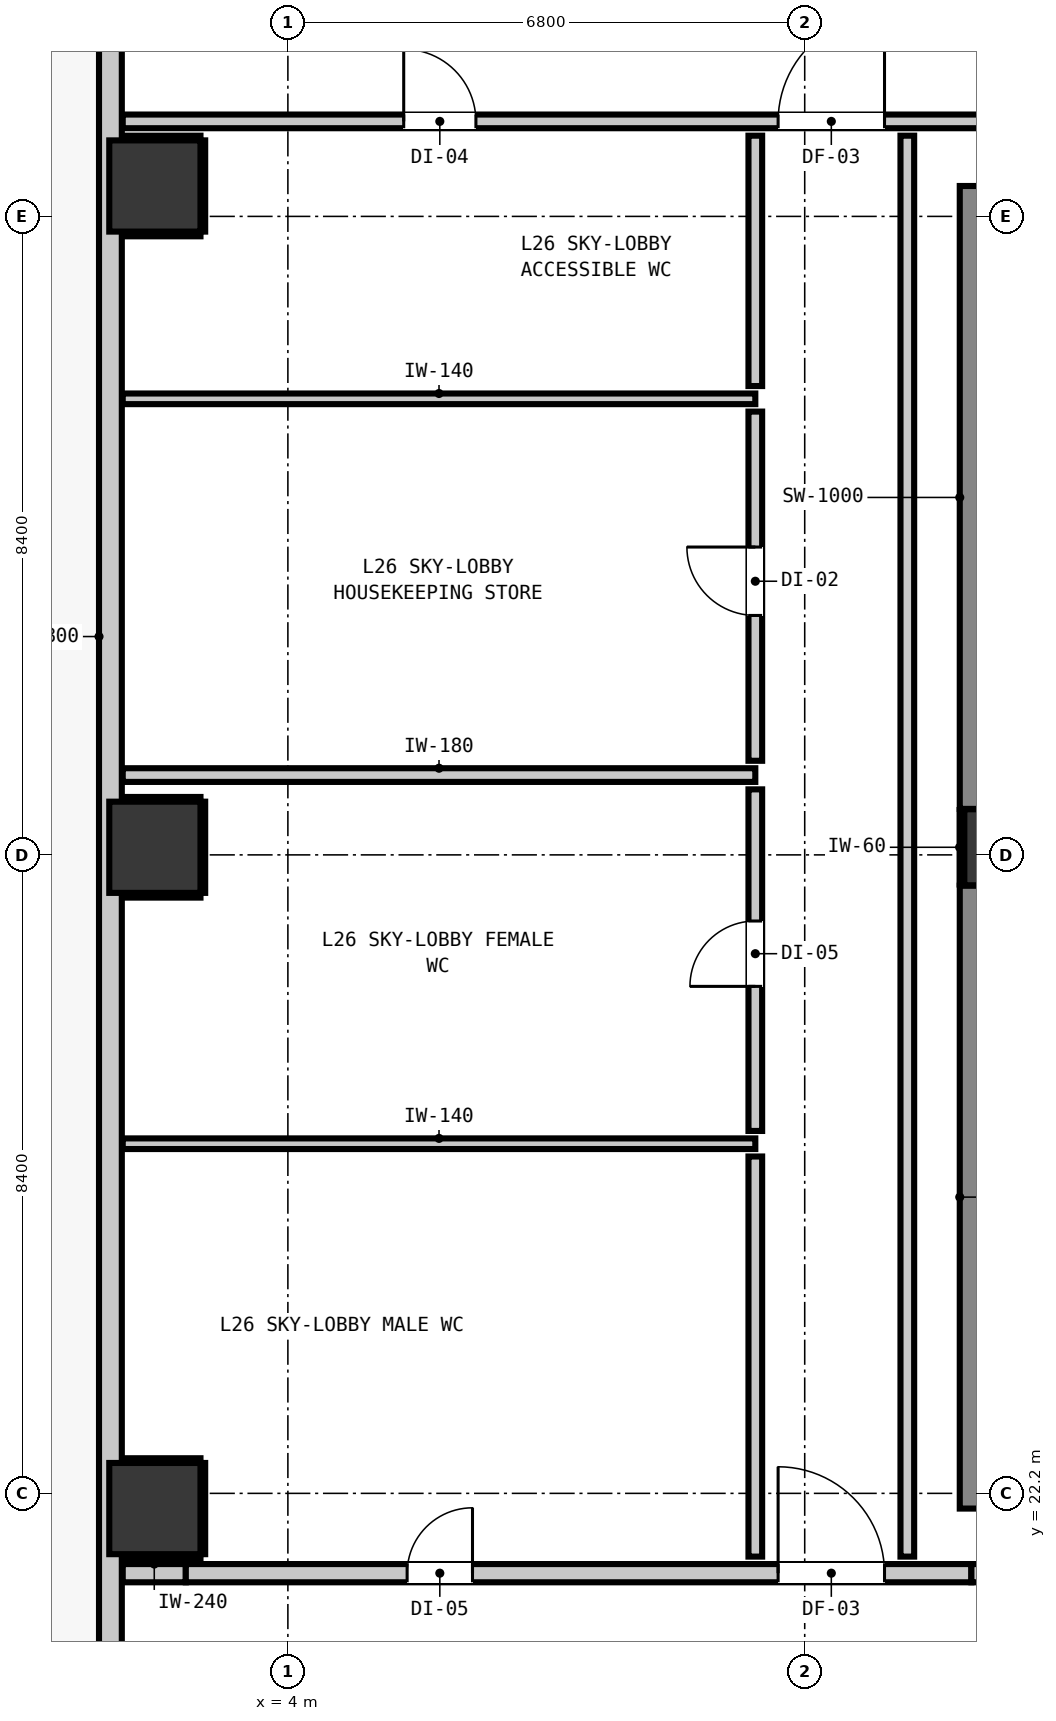
"""IFC4 building model, lengths in metres.
Left out: names, types, materials, properties, quantities, classifications, styles, units other than length and angle.
Written with IfcOpenShell. Run it as: python <this file> out.ifc"""

import sys

from ifc_helpers import new_model, si_unit, direction, frame, frame_2d, origin, origin_2d, place, context, subcontext, project, spatial, rectangle, extrude, element, fill, save


model = new_model("IFC4")
c1 = context("Model", 3, precision=1e-05, world=origin(), true_north=direction((0.0, 1.0)))
c2 = subcontext(c1, "Body", "Model", "MODEL_VIEW")
j1 = project(units=[si_unit("LENGTHUNIT", "METRE"), si_unit("PLANEANGLEUNIT", "RADIAN")], contexts=[c1])
p1 = place(None, origin())
s1 = spatial("IfcSite", under=j1, at=p1, CompositionType="ELEMENT")
p2 = place(p1, origin())
s2 = spatial("IfcBuilding", under=s1, at=p2, CompositionType="ELEMENT")
p3 = place(p2, frame((0.0, 0.0, 92.8)))
s3 = spatial("IfcBuildingStorey", under=s2, at=p3, CompositionType="ELEMENT", Elevation=92.8)
p4 = place(p3, frame((13.4, 30.7, 0.0), z_axis=(0.0, 0.0, 1.0), x_axis=(1.0, 0.0, 0.0)))
e1 = element("IfcColumn", 1, at=p4, inside=s3, PredefinedType="COLUMN", context=c2, shape_type="SweptSolid", body=[
    extrude(rectangle(XDim=1.0, YDim=1.0, at=origin_2d()), origin(), (0.0, 0.0, 1.0), 3.32),
])
p5 = place(p3, frame((13.34, 22.0, 0.0), z_axis=(0.0, 0.0, 1.0), x_axis=(0.0, 1.0, 0.0)))
e2 = element("IfcWall", 2, at=p5, inside=s3, PredefinedType="SHEAR", context=c2, shape_type="SweptSolid", body=[
    extrude(rectangle(XDim=8.195, YDim=1.0, at=frame_2d((4.098, 0.0))), origin(), (0.0, 0.0, 1.0), 3.32),
])
p6 = place(p3, frame((13.34, 31.205, 0.0), z_axis=(0.0, 0.0, 1.0), x_axis=(0.0, 1.0, 0.0)))
e3 = element("IfcWall", 3, at=p6, inside=s3, PredefinedType="SHEAR", context=c2, shape_type="SweptSolid", body=[
    extrude(rectangle(XDim=8.195, YDim=1.0, at=frame_2d((4.097, 0.0))), origin(), (0.0, 0.0, 1.0), 3.32),
])
for number, where, z_axis, x_axis in (
    (4, (2.25, 22.0, 0.0), (0.0, 0.0, 1.0), (1.0, 0.0, 0.0)),
    (5, (2.25, 30.7, 0.0), (0.0, 0.0, 1.0), (1.0, 0.0, 0.0)),
    (6, (2.25, 39.4, 0.0), (0.0, 0.0, 1.0), (1.0, 0.0, 0.0)),
):
    element("IfcColumn", number, at=place(p3, frame(where, z_axis=z_axis, x_axis=x_axis)), inside=s3, PredefinedType="COLUMN", context=c2, shape_type="SweptSolid", body=[
        extrude(rectangle(XDim=1.2, YDim=1.2, at=origin_2d()), origin(), (0.0, 0.0, 1.0), 3.32),
    ])
p7 = place(p3, frame((1.665, 16.365, 0.0), z_axis=(0.0, 0.0, 1.0), x_axis=(0.0, 1.0, 0.0)))
e7 = element("IfcWall", 7, at=p7, inside=s3, PredefinedType="STANDARD", context=c2, shape_type="SweptSolid", body=[
    extrude(rectangle(XDim=34.67, YDim=0.3, at=frame_2d((17.335, 0.0))), origin(), (0.0, 0.0, 1.0), 3.06),
])
p8 = place(p7, frame((0.901, 0.0, 0.0)))
e8 = element("IfcOpeningElement", 8, at=p8, cuts=e7, PredefinedType="OPENING", context=c2, shape_type="SweptSolid", body=[
    extrude(rectangle(XDim=1.0, YDim=2.15, at=frame_2d((0.5, 1.075))), frame((0.0, 0.16, 0.0), z_axis=(0.0, -1.0, 0.0), x_axis=(1.0, 0.0, 0.0)), (0.0, 0.0, 1.0), 0.32),
])
p9 = place(p7, frame((32.314, 0.0, 0.85)))
e9 = element("IfcOpeningElement", 9, at=p9, cuts=e7, PredefinedType="OPENING", context=c2, shape_type="SweptSolid", body=[
    extrude(rectangle(XDim=2.1, YDim=1.9, at=frame_2d((1.05, 0.95))), frame((0.0, 0.16, 0.0), z_axis=(0.0, -1.0, 0.0), x_axis=(1.0, 0.0, 0.0)), (0.0, 0.0, 1.0), 0.32),
])
p10 = place(p3, frame((1.827, 21.15, 0.0), z_axis=(0.0, 0.0, 1.0), x_axis=(1.0, 0.0, 0.0)))
e10 = element("IfcWall", 10, at=p10, inside=s3, PredefinedType="PARTITIONING", context=c2, shape_type="SweptSolid", body=[
    extrude(rectangle(XDim=0.83, YDim=0.24, at=frame_2d((0.415, 0.0))), origin(), (0.0, 0.0, 1.0), 3.06),
])
p11 = place(p3, frame((2.657, 21.15, 0.0), z_axis=(0.0, 0.0, 1.0), x_axis=(1.0, 0.0, 0.0)))
e11 = element("IfcWall", 11, at=p11, inside=s3, PredefinedType="PARTITIONING", context=c2, shape_type="SweptSolid", body=[
    extrude(rectangle(XDim=10.336, YDim=0.24, at=frame_2d((5.168, 0.0))), origin(), (0.0, 0.0, 1.0), 2.445),
])
p12 = place(p11, frame((7.793, 0.0, 0.0)))
e12 = element("IfcOpeningElement", 12, at=p12, cuts=e11, PredefinedType="OPENING", context=c2, shape_type="SweptSolid", body=[
    extrude(rectangle(XDim=1.4, YDim=2.15, at=frame_2d((0.7, 1.075))), frame((0.0, 0.13, 0.0), z_axis=(0.0, -1.0, 0.0), x_axis=(1.0, 0.0, 0.0)), (0.0, 0.0, 1.0), 0.26),
])
p13 = place(p11, frame((2.912, 0.0, 0.0)))
e13 = element("IfcOpeningElement", 13, at=p13, cuts=e11, PredefinedType="OPENING", context=c2, shape_type="SweptSolid", body=[
    extrude(rectangle(XDim=0.86, YDim=2.02, at=frame_2d((0.43, 1.01))), frame((0.0, 0.13, 0.0), z_axis=(0.0, -1.0, 0.0), x_axis=(1.0, 0.0, 0.0)), (0.0, 0.0, 1.0), 0.26),
])
p14 = place(p3, frame((12.993, 21.15, 0.0), z_axis=(0.0, 0.0, 1.0), x_axis=(1.0, 0.0, 0.0)))
e14 = element("IfcWall", 14, at=p14, inside=s3, PredefinedType="PARTITIONING", context=c2, shape_type="SweptSolid", body=[
    extrude(rectangle(XDim=30.98, YDim=0.24, at=frame_2d((15.49, 0.0))), origin(), (0.0, 0.0, 1.0), 3.06),
])
p15 = place(p14, frame((5.217, 0.0, 0.0)))
e15 = element("IfcOpeningElement", 15, at=p15, cuts=e14, PredefinedType="OPENING", context=c2, shape_type="SweptSolid", body=[
    extrude(rectangle(XDim=1.1, YDim=2.15, at=frame_2d((0.55, 1.075))), frame((0.0, 0.13, 0.0), z_axis=(0.0, -1.0, 0.0), x_axis=(1.0, 0.0, 0.0)), (0.0, 0.0, 1.0), 0.26),
])
p16 = place(p14, frame((25.057, 0.0, 0.0)))
e16 = element("IfcOpeningElement", 16, at=p16, cuts=e14, PredefinedType="OPENING", context=c2, shape_type="SweptSolid", body=[
    extrude(rectangle(XDim=1.4, YDim=2.15, at=frame_2d((0.7, 1.075))), frame((0.0, 0.13, 0.0), z_axis=(0.0, -1.0, 0.0), x_axis=(1.0, 0.0, 0.0)), (0.0, 0.0, 1.0), 0.26),
])
p17 = place(p3, frame((1.827, 31.65, 0.0), z_axis=(0.0, 0.0, 1.0), x_axis=(1.0, 0.0, 0.0)))
e17 = element("IfcWall", 17, at=p17, inside=s3, PredefinedType="PARTITIONING", context=c2, shape_type="SweptSolid", body=[
    extrude(rectangle(XDim=8.323, YDim=0.18, at=frame_2d((4.162, 0.0))), origin(), (0.0, 0.0, 1.0), 3.06),
])
p18 = place(p3, frame((1.827, 40.25, 0.0), z_axis=(0.0, 0.0, 1.0), x_axis=(1.0, 0.0, 0.0)))
e18 = element("IfcWall", 18, at=p18, inside=s3, PredefinedType="PARTITIONING", context=c2, shape_type="SweptSolid", body=[
    extrude(rectangle(XDim=42.146, YDim=0.18, at=frame_2d((21.073, 0.0))), origin(), (0.0, 0.0, 1.0), 3.06),
])
p19 = place(p18, frame((15.608, 0.0, 0.0)))
e19 = element("IfcOpeningElement", 19, at=p19, cuts=e18, PredefinedType="OPENING", context=c2, shape_type="SweptSolid", body=[
    extrude(rectangle(XDim=1.4, YDim=2.15, at=frame_2d((0.7, 1.075))), frame((0.0, 0.1, 0.0), z_axis=(0.0, -1.0, 0.0), x_axis=(1.0, 0.0, 0.0)), (0.0, 0.0, 1.0), 0.2),
])
p20 = place(p18, frame((8.623, 0.0, 0.0)))
e20 = element("IfcOpeningElement", 20, at=p20, cuts=e18, PredefinedType="OPENING", context=c2, shape_type="SweptSolid", body=[
    extrude(rectangle(XDim=1.4, YDim=2.15, at=frame_2d((0.7, 1.075))), frame((0.0, 0.1, 0.0), z_axis=(0.0, -1.0, 0.0), x_axis=(1.0, 0.0, 0.0)), (0.0, 0.0, 1.0), 0.2),
])
p21 = place(p18, frame((36.223, 0.0, 0.0)))
e21 = element("IfcOpeningElement", 21, at=p21, cuts=e18, PredefinedType="OPENING", context=c2, shape_type="SweptSolid", body=[
    extrude(rectangle(XDim=1.4, YDim=2.15, at=frame_2d((0.7, 1.075))), frame((0.0, 0.1, 0.0), z_axis=(0.0, -1.0, 0.0), x_axis=(1.0, 0.0, 0.0)), (0.0, 0.0, 1.0), 0.2),
])
p22 = place(p18, frame((3.697, 0.0, 0.0)))
e22 = element("IfcOpeningElement", 22, at=p22, cuts=e18, PredefinedType="OPENING", context=c2, shape_type="SweptSolid", body=[
    extrude(rectangle(XDim=0.95, YDim=2.1, at=frame_2d((0.475, 1.05))), frame((0.0, 0.1, 0.0), z_axis=(0.0, -1.0, 0.0), x_axis=(1.0, 0.0, 0.0)), (0.0, 0.0, 1.0), 0.2),
])
for number, where, z_axis, x_axis in (
    (23, (1.827, 26.8, 0.0), (0.0, 0.0, 1.0), (1.0, 0.0, 0.0)),
    (24, (1.827, 36.6, 0.0), (0.0, 0.0, 1.0), (1.0, 0.0, 0.0)),
):
    element("IfcWall", number, at=place(p3, frame(where, z_axis=z_axis, x_axis=x_axis)), inside=s3, PredefinedType="PARTITIONING", context=c2, shape_type="SweptSolid", body=[
        extrude(rectangle(XDim=8.323, YDim=0.14, at=frame_2d((4.162, 0.0))), origin(), (0.0, 0.0, 1.0), 3.06),
    ])
p23 = place(p3, frame((10.15, 21.368, 0.0), z_axis=(0.0, 0.0, 1.0), x_axis=(0.0, 1.0, 0.0)))
e25 = element("IfcWall", 25, at=p23, inside=s3, PredefinedType="PARTITIONING", context=c2, shape_type="SweptSolid", body=[
    extrude(rectangle(XDim=5.264, YDim=0.18, at=frame_2d((2.632, 0.0))), origin(), (0.0, 0.0, 1.0), 3.06),
])
p24 = place(p3, frame((10.15, 26.968, 0.0), z_axis=(0.0, 0.0, 1.0), x_axis=(0.0, 1.0, 0.0)))
e26 = element("IfcWall", 26, at=p24, inside=s3, PredefinedType="PARTITIONING", context=c2, shape_type="SweptSolid", body=[
    extrude(rectangle(XDim=4.494, YDim=0.18, at=frame_2d((2.247, 0.0))), origin(), (0.0, 0.0, 1.0), 3.06),
])
p25 = place(p24, frame((1.902, 0.0, 0.0)))
e27 = element("IfcOpeningElement", 27, at=p25, cuts=e26, PredefinedType="OPENING", context=c2, shape_type="SweptSolid", body=[
    extrude(rectangle(XDim=0.86, YDim=2.02, at=frame_2d((0.43, 1.01))), frame((0.0, 0.1, 0.0), z_axis=(0.0, -1.0, 0.0), x_axis=(1.0, 0.0, 0.0)), (0.0, 0.0, 1.0), 0.2),
])
p26 = place(p3, frame((10.15, 31.838, 0.0), z_axis=(0.0, 0.0, 1.0), x_axis=(0.0, 1.0, 0.0)))
e28 = element("IfcWall", 28, at=p26, inside=s3, PredefinedType="PARTITIONING", context=c2, shape_type="SweptSolid", body=[
    extrude(rectangle(XDim=4.594, YDim=0.18, at=frame_2d((2.297, 0.0))), origin(), (0.0, 0.0, 1.0), 3.06),
])
p27 = place(p26, frame((1.912, 0.0, 0.0)))
e29 = element("IfcOpeningElement", 29, at=p27, cuts=e28, PredefinedType="OPENING", context=c2, shape_type="SweptSolid", body=[
    extrude(rectangle(XDim=0.9, YDim=2.1, at=frame_2d((0.45, 1.05))), frame((0.0, 0.1, 0.0), z_axis=(0.0, -1.0, 0.0), x_axis=(1.0, 0.0, 0.0)), (0.0, 0.0, 1.0), 0.2),
])
p28 = place(p3, frame((10.15, 36.768, 0.0), z_axis=(0.0, 0.0, 1.0), x_axis=(0.0, 1.0, 0.0)))
e30 = element("IfcWall", 30, at=p28, inside=s3, PredefinedType="PARTITIONING", context=c2, shape_type="SweptSolid", body=[
    extrude(rectangle(XDim=3.294, YDim=0.18, at=frame_2d((1.647, 0.0))), origin(), (0.0, 0.0, 1.0), 3.06),
])
p29 = place(p3, frame((12.15, 21.368, 0.0), z_axis=(0.0, 0.0, 1.0), x_axis=(0.0, 1.0, 0.0)))
e31 = element("IfcWall", 31, at=p29, inside=s3, PredefinedType="PARTITIONING", context=c2, shape_type="SweptSolid", body=[
    extrude(rectangle(XDim=18.694, YDim=0.18, at=frame_2d((9.347, 0.0))), origin(), (0.0, 0.0, 1.0), 3.06),
])
p30 = place(p3, frame((12.868, 30.21, 0.0), z_axis=(0.0, 0.0, 1.0), x_axis=(0.0, 1.0, 0.0)))
e32 = element("IfcWall", 32, at=p30, inside=s3, PredefinedType="PARTITIONING", context=c2, shape_type="SweptSolid", body=[
    extrude(rectangle(XDim=0.98, YDim=0.06, at=frame_2d((0.49, 0.0))), origin(), (0.0, 0.0, 1.0), 1.45),
])
for number, where, z_axis, x_axis in (
    (33, (1.83, 21.368, 0.0), (0.0, 0.0, 1.0), (1.0, 0.0, 0.0)),
    (34, (1.83, 22.632, 0.0), (0.0, 0.0, 1.0), (1.0, 0.0, 0.0)),
):
    element("IfcWall", number, at=place(p3, frame(where, z_axis=z_axis, x_axis=x_axis)), inside=s3, PredefinedType="PARTITIONING", context=c2, shape_type="SweptSolid", body=[
        extrude(rectangle(XDim=1.02, YDim=0.06, at=frame_2d((0.51, 0.0))), origin(), (0.0, 0.0, 1.0), 1.45),
    ])
p31 = place(p3, frame((2.882, 21.4, 0.0), z_axis=(0.0, 0.0, 1.0), x_axis=(0.0, 1.0, 0.0)))
e35 = element("IfcWall", 35, at=p31, inside=s3, PredefinedType="PARTITIONING", context=c2, shape_type="SweptSolid", body=[
    extrude(rectangle(XDim=1.2, YDim=0.06, at=frame_2d((0.6, 0.0))), origin(), (0.0, 0.0, 1.0), 1.45),
])
for number, where, z_axis, x_axis in (
    (36, (1.83, 30.068, 0.0), (0.0, 0.0, 1.0), (1.0, 0.0, 0.0)),
    (37, (1.83, 31.332, 0.0), (0.0, 0.0, 1.0), (1.0, 0.0, 0.0)),
):
    element("IfcWall", number, at=place(p3, frame(where, z_axis=z_axis, x_axis=x_axis)), inside=s3, PredefinedType="PARTITIONING", context=c2, shape_type="SweptSolid", body=[
        extrude(rectangle(XDim=1.02, YDim=0.06, at=frame_2d((0.51, 0.0))), origin(), (0.0, 0.0, 1.0), 1.45),
    ])
p32 = place(p3, frame((2.882, 30.1, 0.0), z_axis=(0.0, 0.0, 1.0), x_axis=(0.0, 1.0, 0.0)))
e38 = element("IfcWall", 38, at=p32, inside=s3, PredefinedType="PARTITIONING", context=c2, shape_type="SweptSolid", body=[
    extrude(rectangle(XDim=1.2, YDim=0.06, at=frame_2d((0.6, 0.0))), origin(), (0.0, 0.0, 1.0), 1.45),
])
for number, where, z_axis, x_axis in (
    (39, (1.83, 38.768, 0.0), (0.0, 0.0, 1.0), (1.0, 0.0, 0.0)),
    (40, (1.83, 40.032, 0.0), (0.0, 0.0, 1.0), (1.0, 0.0, 0.0)),
):
    element("IfcWall", number, at=place(p3, frame(where, z_axis=z_axis, x_axis=x_axis)), inside=s3, PredefinedType="PARTITIONING", context=c2, shape_type="SweptSolid", body=[
        extrude(rectangle(XDim=1.02, YDim=0.06, at=frame_2d((0.51, 0.0))), origin(), (0.0, 0.0, 1.0), 1.45),
    ])
p33 = place(p3, frame((2.882, 38.8, 0.0), z_axis=(0.0, 0.0, 1.0), x_axis=(0.0, 1.0, 0.0)))
e41 = element("IfcWall", 41, at=p33, inside=s3, PredefinedType="PARTITIONING", context=c2, shape_type="SweptSolid", body=[
    extrude(rectangle(XDim=1.2, YDim=0.06, at=frame_2d((0.6, 0.0))), origin(), (0.0, 0.0, 1.0), 1.45),
])
p34 = place(p12, origin())
e42 = element("IfcDoor", 42, at=p34, inside=s3, OperationType="SINGLE_SWING_LEFT", PredefinedType="DOOR", context=c2, shape_type="SweptSolid", body=[
    extrude(rectangle(XDim=1.4, YDim=2.15, at=frame_2d((0.7, 1.075))), frame((0.0, 0.025, 0.0), z_axis=(0.0, -1.0, 0.0), x_axis=(1.0, 0.0, 0.0)), (0.0, 0.0, 1.0), 0.05),
])
fill(e12, e42)
p35 = place(p20, origin())
e43 = element("IfcDoor", 43, at=p35, inside=s3, OperationType="SINGLE_SWING_RIGHT", PredefinedType="DOOR", context=c2, shape_type="SweptSolid", body=[
    extrude(rectangle(XDim=1.4, YDim=2.15, at=frame_2d((0.7, 1.075))), frame((0.0, 0.025, 0.0), z_axis=(0.0, -1.0, 0.0), x_axis=(1.0, 0.0, 0.0)), (0.0, 0.0, 1.0), 0.05),
])
fill(e20, e43)
p36 = place(p13, origin())
e44 = element("IfcDoor", 44, at=p36, inside=s3, OperationType="SINGLE_SWING_RIGHT", PredefinedType="DOOR", context=c2, shape_type="SweptSolid", body=[
    extrude(rectangle(XDim=0.86, YDim=2.02, at=frame_2d((0.43, 1.01))), frame((0.0, 0.025, 0.0), z_axis=(0.0, -1.0, 0.0), x_axis=(1.0, 0.0, 0.0)), (0.0, 0.0, 1.0), 0.05),
])
fill(e13, e44)
p37 = place(p25, origin())
e45 = element("IfcDoor", 45, at=p37, inside=s3, OperationType="SINGLE_SWING_LEFT", PredefinedType="DOOR", context=c2, shape_type="SweptSolid", body=[
    extrude(rectangle(XDim=0.86, YDim=2.02, at=frame_2d((0.43, 1.01))), frame((0.0, 0.025, 0.0), z_axis=(0.0, -1.0, 0.0), x_axis=(1.0, 0.0, 0.0)), (0.0, 0.0, 1.0), 0.05),
])
fill(e27, e45)
p38 = place(p27, origin())
e46 = element("IfcDoor", 46, at=p38, inside=s3, OperationType="SINGLE_SWING_RIGHT", PredefinedType="DOOR", context=c2, shape_type="SweptSolid", body=[
    extrude(rectangle(XDim=0.9, YDim=2.1, at=frame_2d((0.45, 1.05))), frame((0.0, 0.025, 0.0), z_axis=(0.0, -1.0, 0.0), x_axis=(1.0, 0.0, 0.0)), (0.0, 0.0, 1.0), 0.05),
])
fill(e29, e46)
p39 = place(p22, origin())
e47 = element("IfcDoor", 47, at=p39, inside=s3, OperationType="SINGLE_SWING_LEFT", PredefinedType="DOOR", context=c2, shape_type="SweptSolid", body=[
    extrude(rectangle(XDim=0.95, YDim=2.1, at=frame_2d((0.475, 1.05))), frame((0.0, 0.025, 0.0), z_axis=(0.0, -1.0, 0.0), x_axis=(1.0, 0.0, 0.0)), (0.0, 0.0, 1.0), 0.05),
])
fill(e22, e47)
save(model, sys.argv[1])
